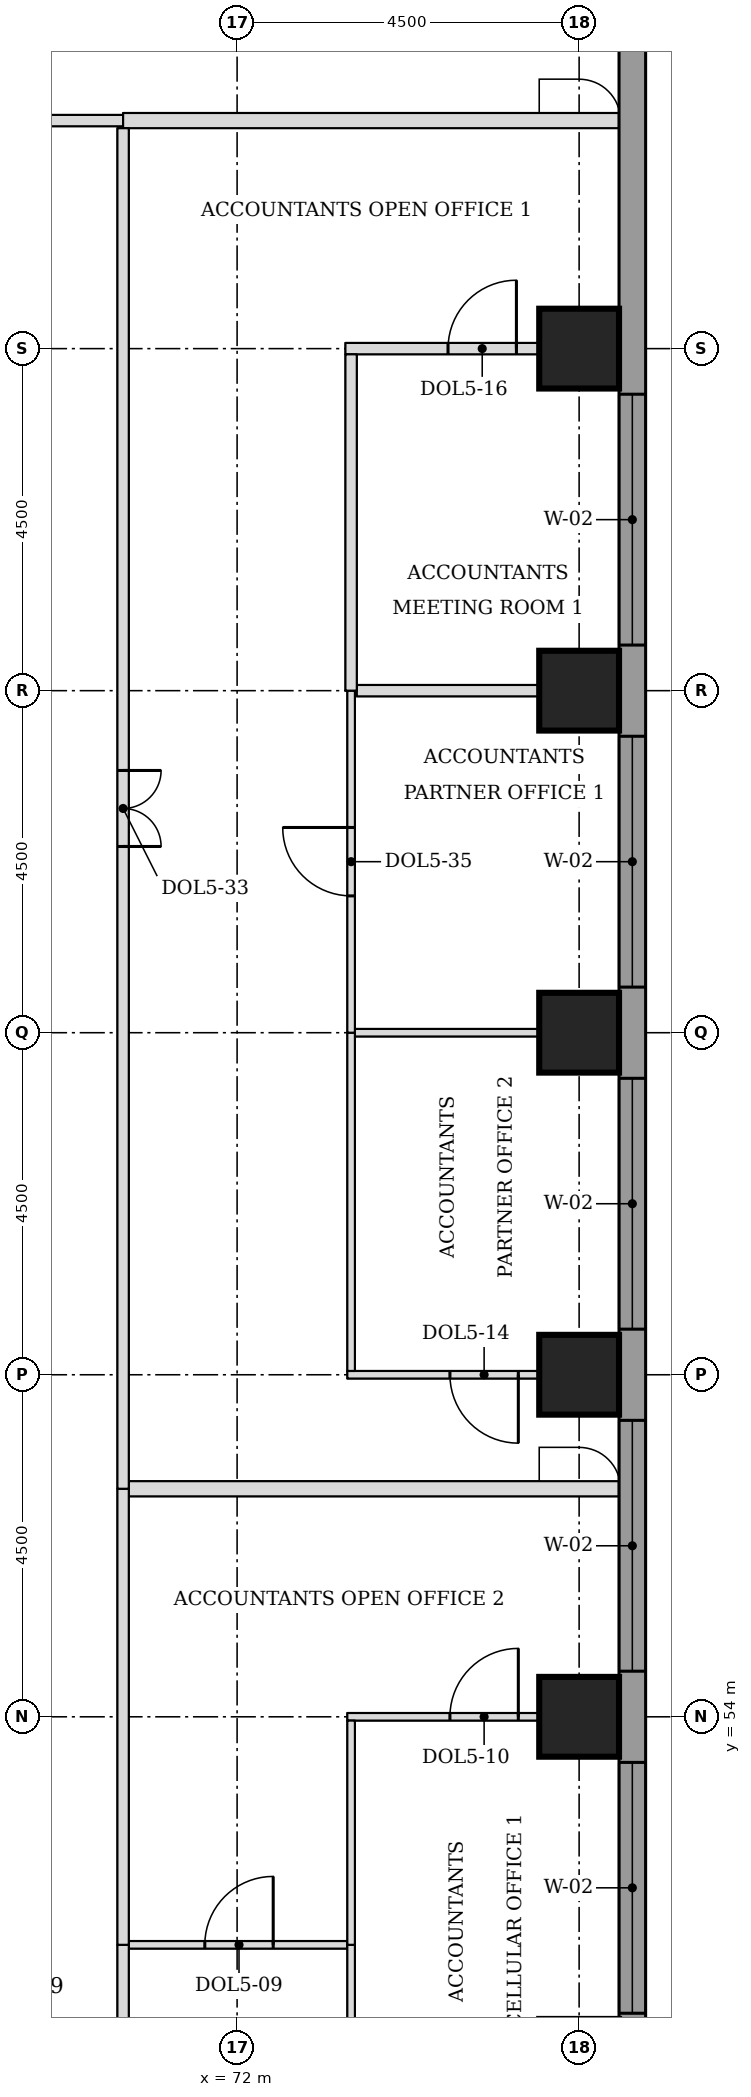
"""IFC4 building model, lengths in metres.
Left out: names, types, materials, properties, quantities, classifications, styles, units other than length and angle.
Written with IfcOpenShell. Run it as: python <this file> out.ifc"""

import sys

from ifc_helpers import new_model, si_unit, direction, frame, frame_2d, origin, origin_2d, place, context, subcontext, project, spatial, rectangle, extrude, element, fill, save


model = new_model("IFC4")
c1 = context("Model", 3, precision=1e-05, world=origin(), true_north=direction((0.0, 1.0)))
c2 = subcontext(c1, "Body", "Model", "MODEL_VIEW")
j1 = project(units=[si_unit("LENGTHUNIT", "METRE"), si_unit("PLANEANGLEUNIT", "RADIAN")], contexts=[c1])
p1 = place(None, origin())
s1 = spatial("IfcSite", under=j1, at=p1, CompositionType="ELEMENT")
p2 = place(p1, origin())
s2 = spatial("IfcBuilding", under=s1, at=p2, CompositionType="ELEMENT")
p3 = place(p2, frame((0.0, 0.0, 112.2)))
s3 = spatial("IfcBuildingStorey", under=s2, at=p3, CompositionType="ELEMENT", Elevation=112.2)
for number, where, z_axis, x_axis in (
    (1, (76.5, 54.0, 0.0), (0.0, 0.0, 1.0), (1.0, 0.0, 0.0)),
    (2, (76.5, 58.5, 0.0), (0.0, 0.0, 1.0), (1.0, 0.0, 0.0)),
    (3, (76.5, 63.0, 0.0), (0.0, 0.0, 1.0), (1.0, 0.0, 0.0)),
    (4, (76.5, 67.5, 0.0), (0.0, 0.0, 1.0), (1.0, 0.0, 0.0)),
    (5, (76.5, 72.0, 0.0), (0.0, 0.0, 1.0), (1.0, 0.0, 0.0)),
):
    element("IfcColumn", number, at=place(p3, frame(where, z_axis=z_axis, x_axis=x_axis)), inside=s3, PredefinedType="COLUMN", context=c2, shape_type="SweptSolid", body=[
        extrude(rectangle(XDim=1.05, YDim=1.05, at=origin_2d()), origin(), (0.0, 0.0, 1.0), 3.7),
    ])
p4 = place(p3, frame((77.2, 44.638, 0.0), z_axis=(0.0, 0.0, 1.0), x_axis=(0.0, 1.0, 0.0)))
e6 = element("IfcWall", 6, at=p4, inside=s3, PredefinedType="STANDARD", context=c2, shape_type="SweptSolid", body=[
    extrude(rectangle(XDim=32.225, YDim=0.35, at=frame_2d((16.112, 0.0))), origin(), (0.0, 0.0, 1.0), 3.525),
])
p5 = place(p4, frame((5.462, 0.0, 0.9)))
e7 = element("IfcOpeningElement", 7, at=p5, cuts=e6, PredefinedType="OPENING", context=c2, shape_type="SweptSolid", body=[
    extrude(rectangle(XDim=3.3, YDim=1.9, at=frame_2d((1.65, 0.95))), frame((0.0, 0.185, 0.0), z_axis=(0.0, -1.0, 0.0), x_axis=(1.0, 0.0, 0.0)), (0.0, 0.0, 1.0), 0.37),
])
p6 = place(p4, frame((9.962, 0.0, 0.9)))
e8 = element("IfcOpeningElement", 8, at=p6, cuts=e6, PredefinedType="OPENING", context=c2, shape_type="SweptSolid", body=[
    extrude(rectangle(XDim=3.3, YDim=1.9, at=frame_2d((1.65, 0.95))), frame((0.0, 0.185, 0.0), z_axis=(0.0, -1.0, 0.0), x_axis=(1.0, 0.0, 0.0)), (0.0, 0.0, 1.0), 0.37),
])
p7 = place(p4, frame((14.462, 0.0, 0.9)))
e9 = element("IfcOpeningElement", 9, at=p7, cuts=e6, PredefinedType="OPENING", context=c2, shape_type="SweptSolid", body=[
    extrude(rectangle(XDim=3.3, YDim=1.9, at=frame_2d((1.65, 0.95))), frame((0.0, 0.185, 0.0), z_axis=(0.0, -1.0, 0.0), x_axis=(1.0, 0.0, 0.0)), (0.0, 0.0, 1.0), 0.37),
])
p8 = place(p4, frame((18.962, 0.0, 0.9)))
e10 = element("IfcOpeningElement", 10, at=p8, cuts=e6, PredefinedType="OPENING", context=c2, shape_type="SweptSolid", body=[
    extrude(rectangle(XDim=3.3, YDim=1.9, at=frame_2d((1.65, 0.95))), frame((0.0, 0.185, 0.0), z_axis=(0.0, -1.0, 0.0), x_axis=(1.0, 0.0, 0.0)), (0.0, 0.0, 1.0), 0.37),
])
p9 = place(p4, frame((23.462, 0.0, 0.9)))
e11 = element("IfcOpeningElement", 11, at=p9, cuts=e6, PredefinedType="OPENING", context=c2, shape_type="SweptSolid", body=[
    extrude(rectangle(XDim=3.3, YDim=1.9, at=frame_2d((1.65, 0.95))), frame((0.0, 0.185, 0.0), z_axis=(0.0, -1.0, 0.0), x_axis=(1.0, 0.0, 0.0)), (0.0, 0.0, 1.0), 0.37),
])
p10 = place(p3, frame((70.575, 51.0, 0.0), z_axis=(0.0, 0.0, 1.0), x_axis=(1.0, 0.0, 0.0)))
e12 = element("IfcWall", 12, at=p10, inside=s3, PredefinedType="PARTITIONING", context=c2, shape_type="SweptSolid", body=[
    extrude(rectangle(XDim=2.875, YDim=0.1, at=frame_2d((1.438, 0.0))), origin(), (0.0, 0.0, 1.0), 3.022),
])
p11 = place(p10, frame((1.0, 0.0, 0.0)))
e13 = element("IfcOpeningElement", 13, at=p11, cuts=e12, PredefinedType="OPENING", context=c2, shape_type="SweptSolid", body=[
    extrude(rectangle(XDim=0.9, YDim=2.1, at=frame_2d((0.45, 1.05))), frame((0.0, 0.06, 0.0), z_axis=(0.0, -1.0, 0.0), x_axis=(1.0, 0.0, 0.0)), (0.0, 0.0, 1.0), 0.12),
])
p12 = place(p3, frame((73.45, 54.0, 0.0), z_axis=(0.0, 0.0, 1.0), x_axis=(1.0, 0.0, 0.0)))
e14 = element("IfcWall", 14, at=p12, inside=s3, PredefinedType="PARTITIONING", context=c2, shape_type="SweptSolid", body=[
    extrude(rectangle(XDim=3.575, YDim=0.1, at=frame_2d((1.788, 0.0))), origin(), (0.0, 0.0, 1.0), 3.55),
])
p13 = place(p12, frame((1.35, 0.0, 0.0)))
e15 = element("IfcOpeningElement", 15, at=p13, cuts=e14, PredefinedType="OPENING", context=c2, shape_type="SweptSolid", body=[
    extrude(rectangle(XDim=0.9, YDim=2.1, at=frame_2d((0.45, 1.05))), frame((0.0, 0.06, 0.0), z_axis=(0.0, -1.0, 0.0), x_axis=(1.0, 0.0, 0.0)), (0.0, 0.0, 1.0), 0.12),
])
p14 = place(p3, frame((70.575, 57.0, 0.0), z_axis=(0.0, 0.0, 1.0), x_axis=(1.0, 0.0, 0.0)))
e16 = element("IfcWall", 16, at=p14, inside=s3, PredefinedType="PARTITIONING", context=c2, shape_type="SweptSolid", body=[
    extrude(rectangle(XDim=6.45, YDim=0.2, at=frame_2d((3.225, 0.0))), origin(), (0.0, 0.0, 1.0), 3.55),
])
p15 = place(p3, frame((73.45, 58.5, 0.0), z_axis=(0.0, 0.0, 1.0), x_axis=(1.0, 0.0, 0.0)))
e17 = element("IfcWall", 17, at=p15, inside=s3, PredefinedType="PARTITIONING", context=c2, shape_type="SweptSolid", body=[
    extrude(rectangle(XDim=3.575, YDim=0.1, at=frame_2d((1.788, 0.0))), origin(), (0.0, 0.0, 1.0), 3.55),
])
p16 = place(p15, frame((1.35, 0.0, 0.0)))
e18 = element("IfcOpeningElement", 18, at=p16, cuts=e17, PredefinedType="OPENING", context=c2, shape_type="SweptSolid", body=[
    extrude(rectangle(XDim=0.9, YDim=2.1, at=frame_2d((0.45, 1.05))), frame((0.0, 0.06, 0.0), z_axis=(0.0, -1.0, 0.0), x_axis=(1.0, 0.0, 0.0)), (0.0, 0.0, 1.0), 0.12),
])
p17 = place(p3, frame((73.55, 63.0, 0.0), z_axis=(0.0, 0.0, 1.0), x_axis=(1.0, 0.0, 0.0)))
e19 = element("IfcWall", 19, at=p17, inside=s3, PredefinedType="PARTITIONING", context=c2, shape_type="SweptSolid", body=[
    extrude(rectangle(XDim=3.475, YDim=0.1, at=frame_2d((1.737, 0.0))), origin(), (0.0, 0.0, 1.0), 3.55),
])
p18 = place(p3, frame((73.575, 67.5, 0.0), z_axis=(0.0, 0.0, 1.0), x_axis=(1.0, 0.0, 0.0)))
e20 = element("IfcWall", 20, at=p18, inside=s3, PredefinedType="PARTITIONING", context=c2, shape_type="SweptSolid", body=[
    extrude(rectangle(XDim=3.45, YDim=0.15, at=frame_2d((1.725, 0.0))), origin(), (0.0, 0.0, 1.0), 3.55),
])
p19 = place(p3, frame((73.425, 72.0, 0.0), z_axis=(0.0, 0.0, 1.0), x_axis=(1.0, 0.0, 0.0)))
e21 = element("IfcWall", 21, at=p19, inside=s3, PredefinedType="PARTITIONING", context=c2, shape_type="SweptSolid", body=[
    extrude(rectangle(XDim=3.6, YDim=0.15, at=frame_2d((1.8, 0.0))), origin(), (0.0, 0.0, 1.0), 3.55),
])
p20 = place(p19, frame((1.35, 0.0, 0.0)))
e22 = element("IfcOpeningElement", 22, at=p20, cuts=e21, PredefinedType="OPENING", context=c2, shape_type="SweptSolid", body=[
    extrude(rectangle(XDim=0.9, YDim=2.1, at=frame_2d((0.45, 1.05))), frame((0.0, 0.085, 0.0), z_axis=(0.0, -1.0, 0.0), x_axis=(1.0, 0.0, 0.0)), (0.0, 0.0, 1.0), 0.17),
])
p21 = place(p3, frame((63.0, 75.0, 0.0), z_axis=(0.0, 0.0, 1.0), x_axis=(1.0, 0.0, 0.0)))
e23 = element("IfcWall", 23, at=p21, inside=s3, PredefinedType="PARTITIONING", context=c2, shape_type="SweptSolid", body=[
    extrude(rectangle(XDim=7.5, YDim=0.15, at=frame_2d((3.75, 0.0))), origin(), (0.0, 0.0, 1.0), 3.55),
])
p22 = place(p21, frame((3.25, 0.0, 0.0)))
e24 = element("IfcOpeningElement", 24, at=p22, cuts=e23, PredefinedType="OPENING", context=c2, shape_type="SweptSolid", body=[
    extrude(rectangle(XDim=1.0, YDim=2.1, at=frame_2d((0.5, 1.05))), frame((0.0, 0.085, 0.0), z_axis=(0.0, -1.0, 0.0), x_axis=(1.0, 0.0, 0.0)), (0.0, 0.0, 1.0), 0.17),
])
p23 = place(p3, frame((70.5, 75.0, 0.0), z_axis=(0.0, 0.0, 1.0), x_axis=(1.0, 0.0, 0.0)))
e25 = element("IfcWall", 25, at=p23, inside=s3, PredefinedType="PARTITIONING", context=c2, shape_type="SweptSolid", body=[
    extrude(rectangle(XDim=6.525, YDim=0.2, at=frame_2d((3.262, 0.0))), origin(), (0.0, 0.0, 1.0), 3.55),
])
p24 = place(p3, frame((70.5, 46.6, 0.0), z_axis=(0.0, 0.0, 1.0), x_axis=(0.0, 1.0, 0.0)))
e26 = element("IfcWall", 26, at=p24, inside=s3, PredefinedType="PARTITIONING", context=c2, shape_type="SweptSolid", body=[
    extrude(rectangle(XDim=4.4, YDim=0.15, at=frame_2d((2.2, 0.0))), origin(), (0.0, 0.0, 1.0), 3.55),
])
p25 = place(p24, frame((1.7, 0.0, 0.0)))
e27 = element("IfcOpeningElement", 27, at=p25, cuts=e26, PredefinedType="OPENING", context=c2, shape_type="SweptSolid", body=[
    extrude(rectangle(XDim=1.0, YDim=2.1, at=frame_2d((0.5, 1.05))), frame((0.0, 0.085, 0.0), z_axis=(0.0, -1.0, 0.0), x_axis=(1.0, 0.0, 0.0)), (0.0, 0.0, 1.0), 0.17),
])
p26 = place(p3, frame((73.5, 49.55, 0.0), z_axis=(0.0, 0.0, 1.0), x_axis=(0.0, 1.0, 0.0)))
e28 = element("IfcWall", 28, at=p26, inside=s3, PredefinedType="PARTITIONING", context=c2, shape_type="SweptSolid", body=[
    extrude(rectangle(XDim=1.45, YDim=0.1, at=frame_2d((0.725, 0.0))), origin(), (0.0, 0.0, 1.0), 3.55),
])
p27 = place(p3, frame((70.5, 51.0, 0.0), z_axis=(0.0, 0.0, 1.0), x_axis=(0.0, 1.0, 0.0)))
e29 = element("IfcWall", 29, at=p27, inside=s3, PredefinedType="PARTITIONING", context=c2, shape_type="SweptSolid", body=[
    extrude(rectangle(XDim=6.0, YDim=0.15, at=frame_2d((3.0, 0.0))), origin(), (0.0, 0.0, 1.0), 3.55),
])
p28 = place(p3, frame((73.5, 51.0, 0.0), z_axis=(0.0, 0.0, 1.0), x_axis=(0.0, 1.0, 0.0)))
e30 = element("IfcWall", 30, at=p28, inside=s3, PredefinedType="PARTITIONING", context=c2, shape_type="SweptSolid", body=[
    extrude(rectangle(XDim=2.95, YDim=0.1, at=frame_2d((1.475, 0.0))), origin(), (0.0, 0.0, 1.0), 3.55),
])
p29 = place(p3, frame((70.5, 57.0, 0.0), z_axis=(0.0, 0.0, 1.0), x_axis=(0.0, 1.0, 0.0)))
e31 = element("IfcWall", 31, at=p29, inside=s3, PredefinedType="PARTITIONING", context=c2, shape_type="SweptSolid", body=[
    extrude(rectangle(XDim=17.9, YDim=0.15, at=frame_2d((8.95, 0.0))), origin(), (0.0, 0.0, 1.0), 3.55),
])
p30 = place(p29, frame((8.45, 0.0, 0.0)))
e32 = element("IfcOpeningElement", 32, at=p30, cuts=e31, PredefinedType="OPENING", context=c2, shape_type="SweptSolid", body=[
    extrude(rectangle(XDim=1.0, YDim=2.1, at=frame_2d((0.5, 1.05))), frame((0.0, 0.085, 0.0), z_axis=(0.0, -1.0, 0.0), x_axis=(1.0, 0.0, 0.0)), (0.0, 0.0, 1.0), 0.17),
])
p31 = place(p3, frame((73.5, 58.55, 0.0), z_axis=(0.0, 0.0, 1.0), x_axis=(0.0, 1.0, 0.0)))
e33 = element("IfcWall", 33, at=p31, inside=s3, PredefinedType="PARTITIONING", context=c2, shape_type="SweptSolid", body=[
    extrude(rectangle(XDim=4.45, YDim=0.1, at=frame_2d((2.225, 0.0))), origin(), (0.0, 0.0, 1.0), 3.55),
])
p32 = place(p3, frame((73.5, 63.0, 0.0), z_axis=(0.0, 0.0, 1.0), x_axis=(0.0, 1.0, 0.0)))
e34 = element("IfcWall", 34, at=p32, inside=s3, PredefinedType="PARTITIONING", context=c2, shape_type="SweptSolid", body=[
    extrude(rectangle(XDim=4.5, YDim=0.1, at=frame_2d((2.25, 0.0))), origin(), (0.0, 0.0, 1.0), 3.55),
])
p33 = place(p32, frame((1.8, 0.0, 0.0)))
e35 = element("IfcOpeningElement", 35, at=p33, cuts=e34, PredefinedType="OPENING", context=c2, shape_type="SweptSolid", body=[
    extrude(rectangle(XDim=0.9, YDim=2.1, at=frame_2d((0.45, 1.05))), frame((0.0, 0.06, 0.0), z_axis=(0.0, -1.0, 0.0), x_axis=(1.0, 0.0, 0.0)), (0.0, 0.0, 1.0), 0.12),
])
p34 = place(p3, frame((73.5, 67.5, 0.0), z_axis=(0.0, 0.0, 1.0), x_axis=(0.0, 1.0, 0.0)))
e36 = element("IfcWall", 36, at=p34, inside=s3, PredefinedType="PARTITIONING", context=c2, shape_type="SweptSolid", body=[
    extrude(rectangle(XDim=4.425, YDim=0.15, at=frame_2d((2.212, 0.0))), origin(), (0.0, 0.0, 1.0), 3.55),
])
p35 = place(p5, origin())
e37 = element("IfcWindow", 37, at=p35, inside=s3, PartitioningType="SINGLE_PANEL", PredefinedType="WINDOW", context=c2, shape_type="SweptSolid", body=[
    extrude(rectangle(XDim=3.3, YDim=1.9, at=frame_2d((1.65, 0.95))), frame((0.0, 0.085, 0.0), z_axis=(0.0, -1.0, 0.0), x_axis=(1.0, 0.0, 0.0)), (0.0, 0.0, 1.0), 0.06),
])
fill(e7, e37)
p36 = place(p6, origin())
e38 = element("IfcWindow", 38, at=p36, inside=s3, PartitioningType="SINGLE_PANEL", PredefinedType="WINDOW", context=c2, shape_type="SweptSolid", body=[
    extrude(rectangle(XDim=3.3, YDim=1.9, at=frame_2d((1.65, 0.95))), frame((0.0, 0.085, 0.0), z_axis=(0.0, -1.0, 0.0), x_axis=(1.0, 0.0, 0.0)), (0.0, 0.0, 1.0), 0.06),
])
fill(e8, e38)
p37 = place(p7, origin())
e39 = element("IfcWindow", 39, at=p37, inside=s3, PartitioningType="SINGLE_PANEL", PredefinedType="WINDOW", context=c2, shape_type="SweptSolid", body=[
    extrude(rectangle(XDim=3.3, YDim=1.9, at=frame_2d((1.65, 0.95))), frame((0.0, 0.085, 0.0), z_axis=(0.0, -1.0, 0.0), x_axis=(1.0, 0.0, 0.0)), (0.0, 0.0, 1.0), 0.06),
])
fill(e9, e39)
p38 = place(p8, origin())
e40 = element("IfcWindow", 40, at=p38, inside=s3, PartitioningType="SINGLE_PANEL", PredefinedType="WINDOW", context=c2, shape_type="SweptSolid", body=[
    extrude(rectangle(XDim=3.3, YDim=1.9, at=frame_2d((1.65, 0.95))), frame((0.0, 0.085, 0.0), z_axis=(0.0, -1.0, 0.0), x_axis=(1.0, 0.0, 0.0)), (0.0, 0.0, 1.0), 0.06),
])
fill(e10, e40)
p39 = place(p9, origin())
e41 = element("IfcWindow", 41, at=p39, inside=s3, PartitioningType="SINGLE_PANEL", PredefinedType="WINDOW", context=c2, shape_type="SweptSolid", body=[
    extrude(rectangle(XDim=3.3, YDim=1.9, at=frame_2d((1.65, 0.95))), frame((0.0, 0.085, 0.0), z_axis=(0.0, -1.0, 0.0), x_axis=(1.0, 0.0, 0.0)), (0.0, 0.0, 1.0), 0.06),
])
fill(e11, e41)
p40 = place(p11, origin())
e42 = element("IfcDoor", 42, at=p40, inside=s3, OperationType="SINGLE_SWING_RIGHT", PredefinedType="DOOR", context=c2, shape_type="SweptSolid", body=[
    extrude(rectangle(XDim=0.9, YDim=2.1, at=frame_2d((0.45, 1.05))), frame((0.0, 0.025, 0.0), z_axis=(0.0, -1.0, 0.0), x_axis=(1.0, 0.0, 0.0)), (0.0, 0.0, 1.0), 0.05),
])
fill(e13, e42)
p41 = place(p13, origin())
e43 = element("IfcDoor", 43, at=p41, inside=s3, OperationType="SINGLE_SWING_RIGHT", PredefinedType="DOOR", context=c2, shape_type="SweptSolid", body=[
    extrude(rectangle(XDim=0.9, YDim=2.1, at=frame_2d((0.45, 1.05))), frame((0.0, 0.025, 0.0), z_axis=(0.0, -1.0, 0.0), x_axis=(1.0, 0.0, 0.0)), (0.0, 0.0, 1.0), 0.05),
])
fill(e15, e43)
p42 = place(p30, frame((1.0, 0.0, 0.0), z_axis=(0.0, 0.0, 1.0), x_axis=(-1.0, 0.0, 0.0)))
e44 = element("IfcDoor", 44, at=p42, inside=s3, OperationType="DOUBLE_DOOR_SINGLE_SWING", PredefinedType="DOOR", context=c2, shape_type="SweptSolid", body=[
    extrude(rectangle(XDim=1.0, YDim=2.1, at=frame_2d((0.5, 1.05))), frame((0.0, 0.025, 0.0), z_axis=(0.0, -1.0, 0.0), x_axis=(1.0, 0.0, 0.0)), (0.0, 0.0, 1.0), 0.05),
])
fill(e32, e44)
p43 = place(p16, frame((0.9, 0.0, 0.0), z_axis=(0.0, 0.0, 1.0), x_axis=(-1.0, 0.0, 0.0)))
e45 = element("IfcDoor", 45, at=p43, inside=s3, OperationType="SINGLE_SWING_LEFT", PredefinedType="DOOR", context=c2, shape_type="SweptSolid", body=[
    extrude(rectangle(XDim=0.9, YDim=2.1, at=frame_2d((0.45, 1.05))), frame((0.0, 0.025, 0.0), z_axis=(0.0, -1.0, 0.0), x_axis=(1.0, 0.0, 0.0)), (0.0, 0.0, 1.0), 0.05),
])
fill(e18, e45)
p44 = place(p33, origin())
e46 = element("IfcDoor", 46, at=p44, inside=s3, OperationType="SINGLE_SWING_RIGHT", PredefinedType="DOOR", context=c2, shape_type="SweptSolid", body=[
    extrude(rectangle(XDim=0.9, YDim=2.1, at=frame_2d((0.45, 1.05))), frame((0.0, 0.025, 0.0), z_axis=(0.0, -1.0, 0.0), x_axis=(1.0, 0.0, 0.0)), (0.0, 0.0, 1.0), 0.05),
])
fill(e35, e46)
p45 = place(p20, origin())
e47 = element("IfcDoor", 47, at=p45, inside=s3, OperationType="SINGLE_SWING_RIGHT", PredefinedType="DOOR", context=c2, shape_type="SweptSolid", body=[
    extrude(rectangle(XDim=0.9, YDim=2.1, at=frame_2d((0.45, 1.05))), frame((0.0, 0.025, 0.0), z_axis=(0.0, -1.0, 0.0), x_axis=(1.0, 0.0, 0.0)), (0.0, 0.0, 1.0), 0.05),
])
fill(e22, e47)
save(model, sys.argv[1])
